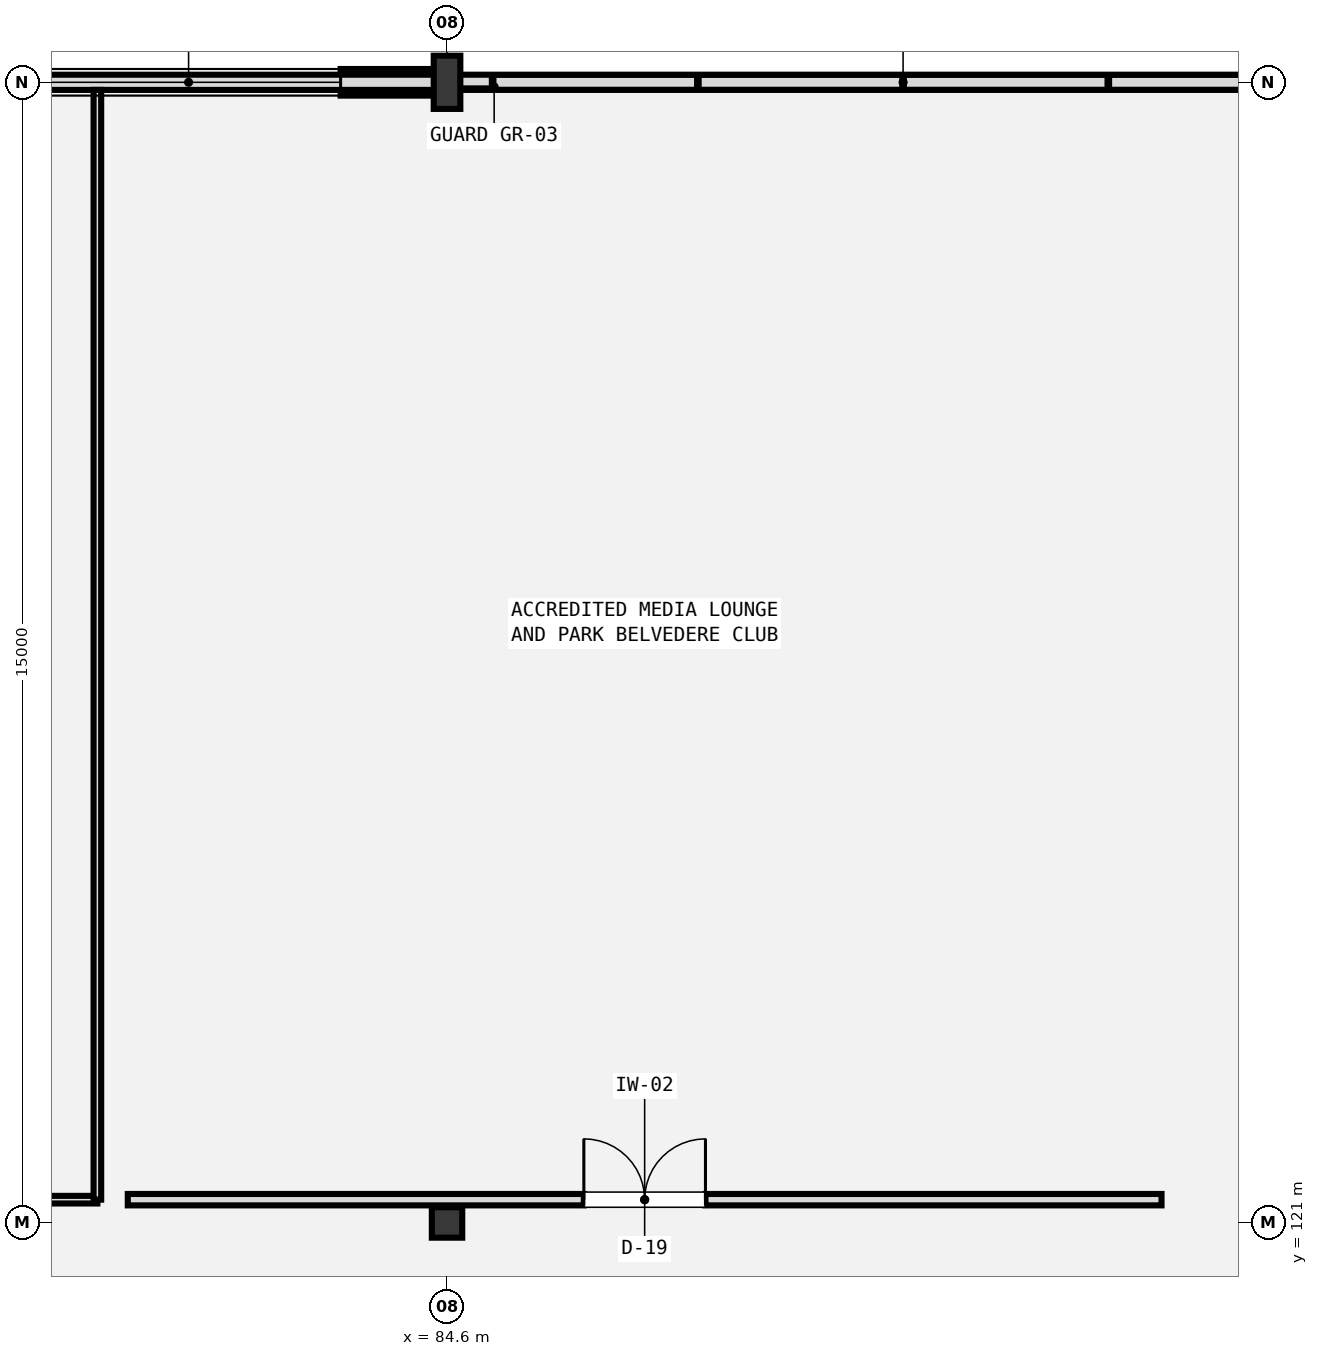
"""IFC4 building model, lengths in metres.
Left out: names, types, materials, properties, quantities, classifications, styles, units other than length and angle.
Written with IfcOpenShell. Run it as: python <this file> out.ifc"""

import sys

from ifc_helpers import new_model, si_unit, direction, frame, frame_2d, origin, origin_2d, place, context, subcontext, project, spatial, rectangle, extrude, element, fill, save


model = new_model("IFC4")
c1 = context("Model", 3, precision=1e-05, world=origin(), true_north=direction((0.0, 1.0)))
c2 = subcontext(c1, "Body", "Model", "MODEL_VIEW")
j1 = project(units=[si_unit("LENGTHUNIT", "METRE"), si_unit("PLANEANGLEUNIT", "RADIAN")], contexts=[c1])
p1 = place(None, origin())
s1 = spatial("IfcSite", under=j1, at=p1, CompositionType="ELEMENT")
p2 = place(p1, origin())
s2 = spatial("IfcBuilding", under=s1, at=p2, CompositionType="ELEMENT")
p3 = place(p2, frame((0.0, 0.0, 18.6)))
s3 = spatial("IfcBuildingStorey", under=s2, at=p3, CompositionType="ELEMENT", Elevation=18.6)
p4 = place(p3, frame((84.6, 121.0, 0.0), z_axis=(0.0, 0.0, 1.0), x_axis=(1.0, 0.0, 0.0)))
e1 = element("IfcColumn", 1, at=p4, inside=s3, PredefinedType="COLUMN", context=c2, shape_type="SweptSolid", body=[
    extrude(rectangle(XDim=0.4, YDim=0.4, at=origin_2d()), origin(), (0.0, 0.0, 1.0), 3.88),
])
p5 = place(p3, frame((84.6, 136.0, 0.0), z_axis=(0.0, 0.0, 1.0), x_axis=(1.0, 0.0, 0.0)))
e2 = element("IfcColumn", 2, at=p5, inside=s3, PredefinedType="COLUMN", context=c2, shape_type="SweptSolid", body=[
    extrude(rectangle(XDim=0.35, YDim=0.7, at=origin_2d()), origin(), (0.0, 0.0, 1.0), 3.88),
])
p6 = place(p3, frame((72.6, 136.0, 0.0), z_axis=(0.0, 0.0, 1.0), x_axis=(1.0, 0.0, 0.0)))
e3 = element("IfcWall", 3, at=p6, inside=s3, PredefinedType="SOLIDWALL", context=c2, shape_type="SweptSolid", body=[
    extrude(rectangle(XDim=12.0, YDim=0.35, at=frame_2d((6.0, 0.0))), origin(), (0.0, 0.0, 1.0), 3.59),
])
p7 = place(p6, frame((1.2, 0.0, 0.95)))
e4 = element("IfcOpeningElement", 4, at=p7, cuts=e3, PredefinedType="OPENING", context=c2, shape_type="SweptSolid", body=[
    extrude(rectangle(XDim=4.5, YDim=1.2, at=frame_2d((2.25, 0.6))), frame((0.0, 0.185, 0.0), z_axis=(0.0, -1.0, 0.0), x_axis=(1.0, 0.0, 0.0)), (0.0, 0.0, 1.0), 0.37),
])
p8 = place(p6, frame((6.6, 0.0, 0.95)))
e5 = element("IfcOpeningElement", 5, at=p8, cuts=e3, PredefinedType="OPENING", context=c2, shape_type="SweptSolid", body=[
    extrude(rectangle(XDim=4.0, YDim=1.2, at=frame_2d((2.0, 0.6))), frame((0.0, 0.185, 0.0), z_axis=(0.0, -1.0, 0.0), x_axis=(1.0, 0.0, 0.0)), (0.0, 0.0, 1.0), 0.37),
])
p9 = place(p3, frame((48.6, 136.0, 4.2), z_axis=(0.0, 0.0, 1.0), x_axis=(1.0, 0.0, 0.0)))
e6 = element("IfcWall", 6, at=p9, inside=s3, PredefinedType="PARAPET", context=c2, shape_type="SweptSolid", body=[
    extrude(rectangle(XDim=48.0, YDim=0.2, at=frame_2d((24.0, 0.0))), origin(), (0.0, 0.0, 1.0), 1.15),
])
p10 = place(p3, frame((66.4, 121.3, 0.0), z_axis=(0.0, 0.0, 1.0), x_axis=(1.0, 0.0, 0.0)))
e7 = element("IfcWall", 7, at=p10, inside=s3, PredefinedType="PARTITIONING", context=c2, shape_type="SweptSolid", body=[
    extrude(rectangle(XDim=13.6, YDim=0.1, at=frame_2d((6.8, 0.0))), origin(), (0.0, 0.0, 1.0), 3.25),
])
p11 = place(p10, frame((2.8, 0.0, 0.0)))
e8 = element("IfcOpeningElement", 8, at=p11, cuts=e7, PredefinedType="OPENING", context=c2, shape_type="SweptSolid", body=[
    extrude(rectangle(XDim=1.1, YDim=2.2, at=frame_2d((0.55, 1.1))), frame((0.0, 0.06, 0.0), z_axis=(0.0, -1.0, 0.0), x_axis=(1.0, 0.0, 0.0)), (0.0, 0.0, 1.0), 0.12),
])
p12 = place(p3, frame((80.0, 121.3, 0.0), z_axis=(0.0, 0.0, 1.0), x_axis=(0.0, 1.0, 0.0)))
e9 = element("IfcWall", 9, at=p12, inside=s3, PredefinedType="PARTITIONING", context=c2, shape_type="SweptSolid", body=[
    extrude(rectangle(XDim=14.6, YDim=0.1, at=frame_2d((7.3, 0.0))), origin(), (0.0, 0.0, 1.0), 3.25),
])
p13 = place(p3, frame((80.4, 121.3, 0.0), z_axis=(0.0, 0.0, 1.0), x_axis=(1.0, 0.0, 0.0)))
e10 = element("IfcWall", 10, at=p13, inside=s3, PredefinedType="PARTITIONING", context=c2, shape_type="SweptSolid", body=[
    extrude(rectangle(XDim=13.6, YDim=0.15, at=frame_2d((6.8, 0.0))), origin(), (0.0, 0.0, 1.0), 3.25),
])
p14 = place(p13, frame((6.0, 0.0, 0.0)))
e11 = element("IfcOpeningElement", 11, at=p14, cuts=e10, PredefinedType="OPENING", context=c2, shape_type="SweptSolid", body=[
    extrude(rectangle(XDim=1.6, YDim=2.2, at=frame_2d((0.8, 1.1))), frame((0.0, 0.085, 0.0), z_axis=(0.0, -1.0, 0.0), x_axis=(1.0, 0.0, 0.0)), (0.0, 0.0, 1.0), 0.17),
])
p15 = place(p8, origin())
e12 = element("IfcWindow", 12, at=p15, inside=s3, PartitioningType="TRIPLE_PANEL_HORIZONTAL", PredefinedType="WINDOW", context=c2, shape_type="SweptSolid", body=[
    extrude(rectangle(XDim=4.0, YDim=1.2, at=frame_2d((2.0, 0.6))), frame((0.0, 0.03, 0.0), z_axis=(0.0, -1.0, 0.0), x_axis=(1.0, 0.0, 0.0)), (0.0, 0.0, 1.0), 0.06),
])
fill(e5, e12)
p16 = place(p14, origin())
e13 = element("IfcDoor", 13, at=p16, inside=s3, OperationType="DOUBLE_DOOR_SINGLE_SWING", PredefinedType="DOOR", context=c2, shape_type="SweptSolid", body=[
    extrude(rectangle(XDim=1.6, YDim=2.2, at=frame_2d((0.8, 1.1))), frame((0.0, 0.025, 0.0), z_axis=(0.0, -1.0, 0.0), x_axis=(1.0, 0.0, 0.0)), (0.0, 0.0, 1.0), 0.05),
])
fill(e11, e13)
save(model, sys.argv[1])
